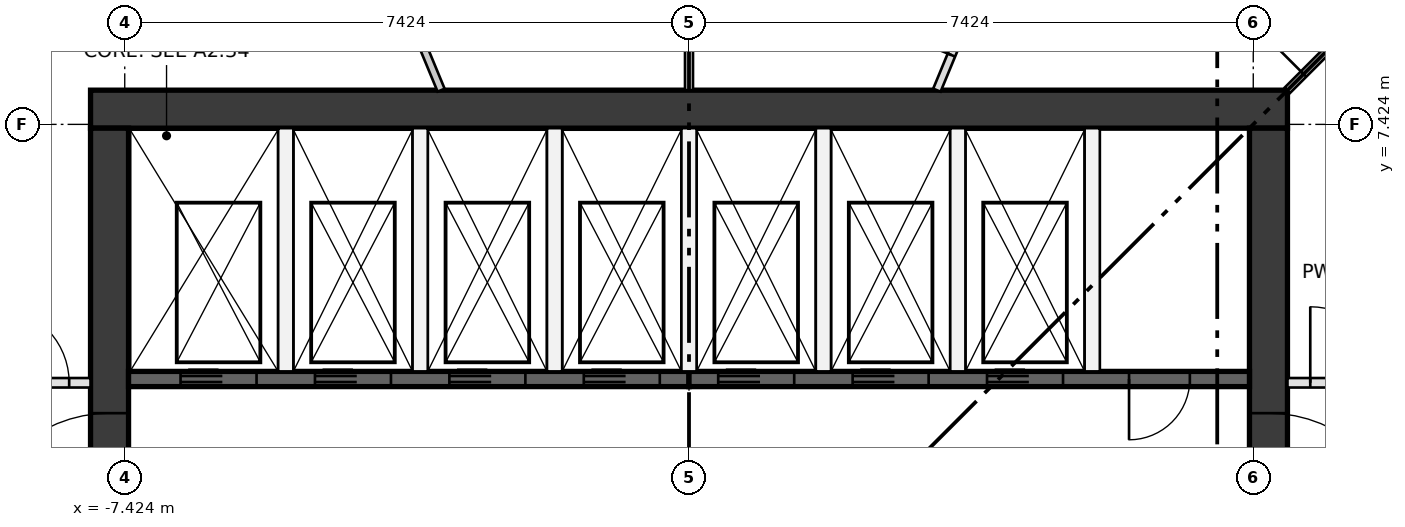
"""IFC4 building model, lengths in metres.
Left out: names, types, materials, properties, quantities, classifications, styles, units other than length and angle.
Written with IfcOpenShell. Run it as: python <this file> out.ifc"""

import sys

from ifc_helpers import new_model, si_unit, direction, frame, frame_2d, origin, place, context, subcontext, project, spatial, rectangle, extrude, element, fill, save


model = new_model("IFC4")
c1 = context("Model", 3, precision=1e-05, world=origin(), true_north=direction((0.0, 1.0)))
c2 = subcontext(c1, "Body", "Model", "MODEL_VIEW")
j1 = project(units=[si_unit("LENGTHUNIT", "METRE"), si_unit("PLANEANGLEUNIT", "RADIAN")], contexts=[c1])
p1 = place(None, origin())
s1 = spatial("IfcSite", under=j1, at=p1, CompositionType="ELEMENT")
p2 = place(p1, origin())
s2 = spatial("IfcBuilding", under=s1, at=p2, CompositionType="ELEMENT")
p3 = place(p2, frame((0.0, 0.0, 207.75)))
s3 = spatial("IfcBuildingStorey", under=s2, at=p3, CompositionType="ELEMENT", Elevation=207.75)
p4 = place(p3, frame((-7.874, 7.624, 0.0), z_axis=(0.0, 0.0, 1.0), x_axis=(1.0, 0.0, 0.0)))
e1 = element("IfcWall", 1, at=p4, inside=s3, PredefinedType="SHEAR", context=c2, shape_type="SweptSolid", body=[
    extrude(rectangle(XDim=15.748, YDim=0.5, at=frame_2d((7.874, 0.0))), origin(), (0.0, 0.0, 1.0), 3.35),
])
p5 = place(p3, frame((-7.624, -7.374, 0.0), z_axis=(0.0, 0.0, 1.0), x_axis=(0.0, 1.0, 0.0)))
e2 = element("IfcWall", 2, at=p5, inside=s3, PredefinedType="SHEAR", context=c2, shape_type="SweptSolid", body=[
    extrude(rectangle(XDim=14.748, YDim=0.5, at=frame_2d((7.374, 0.0))), origin(), (0.0, 0.0, 1.0), 3.35),
])
p6 = place(p5, frame((6.874, 0.0, 0.0)))
e3 = element("IfcOpeningElement", 3, at=p6, cuts=e2, PredefinedType="OPENING", context=c2, shape_type="SweptSolid", body=[
    extrude(rectangle(XDim=1.0, YDim=2.1, at=frame_2d((0.5, 1.05))), frame((0.0, 0.26, 0.0), z_axis=(0.0, -1.0, 0.0), x_axis=(1.0, 0.0, 0.0)), (0.0, 0.0, 1.0), 0.52),
])
p7 = place(p5, frame((3.75, 0.0, 0.0)))
e4 = element("IfcOpeningElement", 4, at=p7, cuts=e2, PredefinedType="OPENING", context=c2, shape_type="SweptSolid", body=[
    extrude(rectangle(XDim=1.8, YDim=2.1, at=frame_2d((0.9, 1.05))), frame((0.0, 0.26, 0.0), z_axis=(0.0, -1.0, 0.0), x_axis=(1.0, 0.0, 0.0)), (0.0, 0.0, 1.0), 0.52),
])
p8 = place(p5, frame((9.198, 0.0, 0.0)))
e5 = element("IfcOpeningElement", 5, at=p8, cuts=e2, PredefinedType="OPENING", context=c2, shape_type="SweptSolid", body=[
    extrude(rectangle(XDim=1.8, YDim=2.1, at=frame_2d((0.9, 1.05))), frame((0.0, 0.26, 0.0), z_axis=(0.0, -1.0, 0.0), x_axis=(1.0, 0.0, 0.0)), (0.0, 0.0, 1.0), 0.52),
])
p9 = place(p3, frame((7.624, -7.374, 0.0), z_axis=(0.0, 0.0, 1.0), x_axis=(0.0, 1.0, 0.0)))
e6 = element("IfcWall", 6, at=p9, inside=s3, PredefinedType="SHEAR", context=c2, shape_type="SweptSolid", body=[
    extrude(rectangle(XDim=14.748, YDim=0.5, at=frame_2d((7.374, 0.0))), origin(), (0.0, 0.0, 1.0), 3.35),
])
p10 = place(p9, frame((6.874, 0.0, 0.0)))
e7 = element("IfcOpeningElement", 7, at=p10, cuts=e6, PredefinedType="OPENING", context=c2, shape_type="SweptSolid", body=[
    extrude(rectangle(XDim=1.0, YDim=2.1, at=frame_2d((0.5, 1.05))), frame((0.0, 0.26, 0.0), z_axis=(0.0, -1.0, 0.0), x_axis=(1.0, 0.0, 0.0)), (0.0, 0.0, 1.0), 0.52),
])
p11 = place(p9, frame((3.75, 0.0, 0.0)))
e8 = element("IfcOpeningElement", 8, at=p11, cuts=e6, PredefinedType="OPENING", context=c2, shape_type="SweptSolid", body=[
    extrude(rectangle(XDim=1.8, YDim=2.1, at=frame_2d((0.9, 1.05))), frame((0.0, 0.26, 0.0), z_axis=(0.0, -1.0, 0.0), x_axis=(1.0, 0.0, 0.0)), (0.0, 0.0, 1.0), 0.52),
])
p12 = place(p9, frame((9.198, 0.0, 0.0)))
e9 = element("IfcOpeningElement", 9, at=p12, cuts=e6, PredefinedType="OPENING", context=c2, shape_type="SweptSolid", body=[
    extrude(rectangle(XDim=1.8, YDim=2.1, at=frame_2d((0.9, 1.05))), frame((0.0, 0.26, 0.0), z_axis=(0.0, -1.0, 0.0), x_axis=(1.0, 0.0, 0.0)), (0.0, 0.0, 1.0), 0.52),
])
p13 = place(p3, frame((-7.374, 4.074, 0.0), z_axis=(0.0, 0.0, 1.0), x_axis=(1.0, 0.0, 0.0)))
e10 = element("IfcWall", 10, at=p13, inside=s3, PredefinedType="SHEAR", context=c2, shape_type="SweptSolid", body=[
    extrude(rectangle(XDim=7.374, YDim=0.2, at=frame_2d((3.687, 0.0))), origin(), (0.0, 0.0, 1.0), 3.0),
])
p14 = place(p13, frame((0.684, 0.0, 0.0)))
e11 = element("IfcOpeningElement", 11, at=p14, cuts=e10, PredefinedType="OPENING", context=c2, shape_type="SweptSolid", body=[
    extrude(rectangle(XDim=1.0, YDim=2.1, at=frame_2d((0.5, 1.05))), frame((0.0, 0.11, 0.0), z_axis=(0.0, -1.0, 0.0), x_axis=(1.0, 0.0, 0.0)), (0.0, 0.0, 1.0), 0.22),
])
p15 = place(p13, frame((2.453, 0.0, 0.0)))
e12 = element("IfcOpeningElement", 12, at=p15, cuts=e10, PredefinedType="OPENING", context=c2, shape_type="SweptSolid", body=[
    extrude(rectangle(XDim=1.0, YDim=2.1, at=frame_2d((0.5, 1.05))), frame((0.0, 0.11, 0.0), z_axis=(0.0, -1.0, 0.0), x_axis=(1.0, 0.0, 0.0)), (0.0, 0.0, 1.0), 0.22),
])
p16 = place(p13, frame((4.221, 0.0, 0.0)))
e13 = element("IfcOpeningElement", 13, at=p16, cuts=e10, PredefinedType="OPENING", context=c2, shape_type="SweptSolid", body=[
    extrude(rectangle(XDim=1.0, YDim=2.1, at=frame_2d((0.5, 1.05))), frame((0.0, 0.11, 0.0), z_axis=(0.0, -1.0, 0.0), x_axis=(1.0, 0.0, 0.0)), (0.0, 0.0, 1.0), 0.22),
])
p17 = place(p13, frame((5.99, 0.0, 0.0)))
e14 = element("IfcOpeningElement", 14, at=p17, cuts=e10, PredefinedType="OPENING", context=c2, shape_type="SweptSolid", body=[
    extrude(rectangle(XDim=1.0, YDim=2.1, at=frame_2d((0.5, 1.05))), frame((0.0, 0.11, 0.0), z_axis=(0.0, -1.0, 0.0), x_axis=(1.0, 0.0, 0.0)), (0.0, 0.0, 1.0), 0.22),
])
p18 = place(p3, frame((0.0, 4.074, 0.0), z_axis=(0.0, 0.0, 1.0), x_axis=(1.0, 0.0, 0.0)))
e15 = element("IfcWall", 15, at=p18, inside=s3, PredefinedType="SHEAR", context=c2, shape_type="SweptSolid", body=[
    extrude(rectangle(XDim=7.374, YDim=0.2, at=frame_2d((3.687, 0.0))), origin(), (0.0, 0.0, 1.0), 3.0),
])
p19 = place(p18, frame((0.384, 0.0, 0.0)))
e16 = element("IfcOpeningElement", 16, at=p19, cuts=e15, PredefinedType="OPENING", context=c2, shape_type="SweptSolid", body=[
    extrude(rectangle(XDim=1.0, YDim=2.1, at=frame_2d((0.5, 1.05))), frame((0.0, 0.11, 0.0), z_axis=(0.0, -1.0, 0.0), x_axis=(1.0, 0.0, 0.0)), (0.0, 0.0, 1.0), 0.22),
])
p20 = place(p18, frame((2.153, 0.0, 0.0)))
e17 = element("IfcOpeningElement", 17, at=p20, cuts=e15, PredefinedType="OPENING", context=c2, shape_type="SweptSolid", body=[
    extrude(rectangle(XDim=1.0, YDim=2.1, at=frame_2d((0.5, 1.05))), frame((0.0, 0.11, 0.0), z_axis=(0.0, -1.0, 0.0), x_axis=(1.0, 0.0, 0.0)), (0.0, 0.0, 1.0), 0.22),
])
p21 = place(p18, frame((3.921, 0.0, 0.0)))
e18 = element("IfcOpeningElement", 18, at=p21, cuts=e15, PredefinedType="OPENING", context=c2, shape_type="SweptSolid", body=[
    extrude(rectangle(XDim=1.0, YDim=2.1, at=frame_2d((0.5, 1.05))), frame((0.0, 0.11, 0.0), z_axis=(0.0, -1.0, 0.0), x_axis=(1.0, 0.0, 0.0)), (0.0, 0.0, 1.0), 0.22),
])
p22 = place(p18, frame((5.79, 0.0, 0.0)))
e19 = element("IfcOpeningElement", 19, at=p22, cuts=e15, PredefinedType="OPENING", context=c2, shape_type="SweptSolid", body=[
    extrude(rectangle(XDim=0.8, YDim=2.1, at=frame_2d((0.4, 1.05))), frame((0.0, 0.11, 0.0), z_axis=(0.0, -1.0, 0.0), x_axis=(1.0, 0.0, 0.0)), (0.0, 0.0, 1.0), 0.22),
])
for number, where, z_axis, x_axis in (
    (20, (-5.305, 4.174, 0.0), (0.0, 0.0, 1.0), (0.0, 1.0, 0.0)),
    (21, (-3.537, 4.174, 0.0), (0.0, 0.0, 1.0), (0.0, 1.0, 0.0)),
    (22, (-1.769, 4.174, 0.0), (0.0, 0.0, 1.0), (0.0, 1.0, 0.0)),
    (23, (0.0, 4.174, 0.0), (0.0, 0.0, 1.0), (0.0, 1.0, 0.0)),
    (24, (1.769, 4.174, 0.0), (0.0, 0.0, 1.0), (0.0, 1.0, 0.0)),
    (25, (3.537, 4.174, 0.0), (0.0, 0.0, 1.0), (0.0, 1.0, 0.0)),
    (26, (5.305, 4.174, 0.0), (0.0, 0.0, 1.0), (0.0, 1.0, 0.0)),
):
    element("IfcWall", number, at=place(p3, frame(where, z_axis=z_axis, x_axis=x_axis)), inside=s3, PredefinedType="PARTITIONING", context=c2, shape_type="SweptSolid", body=[
        extrude(rectangle(XDim=3.2, YDim=0.2, at=frame_2d((1.6, 0.0))), origin(), (0.0, 0.0, 1.0), 3.0),
    ])
p23 = place(p3, frame((7.874, 4.024, 0.0), z_axis=(0.0, 0.0, 1.0), x_axis=(1.0, 0.0, 0.0)))
e27 = element("IfcWall", 27, at=p23, inside=s3, PredefinedType="PARTITIONING", context=c2, shape_type="SweptSolid", body=[
    extrude(rectangle(XDim=2.475, YDim=0.125, at=frame_2d((1.238, 0.0))), origin(), (0.0, 0.0, 1.0), 3.0),
])
p24 = place(p23, frame((0.3, 0.0, 0.0)))
e28 = element("IfcOpeningElement", 28, at=p24, cuts=e27, PredefinedType="OPENING", context=c2, shape_type="SweptSolid", body=[
    extrude(rectangle(XDim=1.0, YDim=2.1, at=frame_2d((0.5, 1.05))), frame((0.0, 0.073, 0.0), z_axis=(0.0, -1.0, 0.0), x_axis=(1.0, 0.0, 0.0)), (0.0, 0.0, 1.0), 0.145),
])
p25 = place(p3, frame((-9.436, 4.024, 0.0), z_axis=(0.0, 0.0, 1.0), x_axis=(1.0, 0.0, 0.0)))
e29 = element("IfcWall", 29, at=p25, inside=s3, PredefinedType="PARTITIONING", context=c2, shape_type="SweptSolid", body=[
    extrude(rectangle(XDim=1.562, YDim=0.125, at=frame_2d((0.781, 0.0))), origin(), (0.0, 0.0, 1.0), 3.0),
])
p26 = place(p25, frame((0.281, 0.0, 0.0)))
e30 = element("IfcOpeningElement", 30, at=p26, cuts=e29, PredefinedType="OPENING", context=c2, shape_type="SweptSolid", body=[
    extrude(rectangle(XDim=1.0, YDim=2.1, at=frame_2d((0.5, 1.05))), frame((0.0, 0.073, 0.0), z_axis=(0.0, -1.0, 0.0), x_axis=(1.0, 0.0, 0.0)), (0.0, 0.0, 1.0), 0.145),
])
p27 = place(p3, frame((7.874, 7.874, 0.0), z_axis=(0.0, 0.0, 1.0), x_axis=(0.707106781187, 0.707106781187, 0.0)))
e31 = element("IfcWall", 31, at=p27, inside=s3, PredefinedType="PARTITIONING", context=c2, shape_type="SweptSolid", body=[
    extrude(rectangle(XDim=4.334, YDim=0.1, at=frame_2d((2.167, 0.0))), origin(), (0.0, 0.0, 1.0), 3.0),
])
p28 = place(p27, frame((0.3, 0.0, 0.0)))
e32 = element("IfcOpeningElement", 32, at=p28, cuts=e31, PredefinedType="OPENING", context=c2, shape_type="SweptSolid", body=[
    extrude(rectangle(XDim=1.0, YDim=2.1, at=frame_2d((0.5, 1.05))), frame((0.0, 0.06, 0.0), z_axis=(0.0, -1.0, 0.0), x_axis=(1.0, 0.0, 0.0)), (0.0, 0.0, 1.0), 0.12),
])
p29 = place(p3, frame((3.261, 7.874, 0.0), z_axis=(0.0, 0.0, 1.0), x_axis=(0.382670108955, 0.923885051136, 0.0)))
e33 = element("IfcWall", 33, at=p29, inside=s3, PredefinedType="PARTITIONING", context=c2, shape_type="SweptSolid", body=[
    extrude(rectangle(XDim=2.077, YDim=0.105, at=frame_2d((1.039, 0.0))), origin(), (0.0, 0.0, 1.0), 3.0),
])
p30 = place(p29, frame((0.5, 0.0, 0.0)))
e34 = element("IfcOpeningElement", 34, at=p30, cuts=e33, PredefinedType="OPENING", context=c2, shape_type="SweptSolid", body=[
    extrude(rectangle(XDim=1.0, YDim=2.1, at=frame_2d((0.5, 1.05))), frame((0.0, 0.062, 0.0), z_axis=(0.0, -1.0, 0.0), x_axis=(1.0, 0.0, 0.0)), (0.0, 0.0, 1.0), 0.125),
])
p31 = place(p3, frame((0.0, 7.874, 0.0), z_axis=(0.0, 0.0, 1.0), x_axis=(0.0, 1.0, 0.0)))
e35 = element("IfcWall", 35, at=p31, inside=s3, PredefinedType="PARTITIONING", context=c2, shape_type="SweptSolid", body=[
    extrude(rectangle(XDim=2.726, YDim=0.105, at=frame_2d((1.363, 0.0))), origin(), (0.0, 0.0, 1.0), 3.0),
])
p32 = place(p3, frame((-4.056, 9.793, 0.0), z_axis=(0.0, 0.0, 1.0), x_axis=(0.382670108955, -0.923885051136, 0.0)))
e36 = element("IfcWall", 36, at=p32, inside=s3, PredefinedType="PARTITIONING", context=c2, shape_type="SweptSolid", body=[
    extrude(rectangle(XDim=2.077, YDim=0.1, at=frame_2d((1.039, 0.0))), origin(), (0.0, 0.0, 1.0), 3.0),
])
p33 = place(p32, frame((0.5, 0.0, 0.0)))
e37 = element("IfcOpeningElement", 37, at=p33, cuts=e36, PredefinedType="OPENING", context=c2, shape_type="SweptSolid", body=[
    extrude(rectangle(XDim=1.0, YDim=2.1, at=frame_2d((0.5, 1.05))), frame((0.0, 0.06, 0.0), z_axis=(0.0, -1.0, 0.0), x_axis=(1.0, 0.0, 0.0)), (0.0, 0.0, 1.0), 0.12),
])
p34 = place(p14, frame((1.0, 0.0, 0.0), z_axis=(0.0, 0.0, 1.0), x_axis=(-1.0, 0.0, 0.0)))
e38 = element("IfcDoor", 38, at=p34, inside=s3, OperationType="DOUBLE_DOOR_SLIDING", PredefinedType="DOOR", context=c2, shape_type="SweptSolid", body=[
    extrude(rectangle(XDim=1.0, YDim=2.1, at=frame_2d((0.5, 1.05))), frame((0.0, 0.025, 0.0), z_axis=(0.0, -1.0, 0.0), x_axis=(1.0, 0.0, 0.0)), (0.0, 0.0, 1.0), 0.05),
])
fill(e11, e38)
p35 = place(p15, frame((1.0, 0.0, 0.0), z_axis=(0.0, 0.0, 1.0), x_axis=(-1.0, 0.0, 0.0)))
e39 = element("IfcDoor", 39, at=p35, inside=s3, OperationType="DOUBLE_DOOR_SLIDING", PredefinedType="DOOR", context=c2, shape_type="SweptSolid", body=[
    extrude(rectangle(XDim=1.0, YDim=2.1, at=frame_2d((0.5, 1.05))), frame((0.0, 0.025, 0.0), z_axis=(0.0, -1.0, 0.0), x_axis=(1.0, 0.0, 0.0)), (0.0, 0.0, 1.0), 0.05),
])
fill(e12, e39)
p36 = place(p16, frame((1.0, 0.0, 0.0), z_axis=(0.0, 0.0, 1.0), x_axis=(-1.0, 0.0, 0.0)))
e40 = element("IfcDoor", 40, at=p36, inside=s3, OperationType="DOUBLE_DOOR_SLIDING", PredefinedType="DOOR", context=c2, shape_type="SweptSolid", body=[
    extrude(rectangle(XDim=1.0, YDim=2.1, at=frame_2d((0.5, 1.05))), frame((0.0, 0.025, 0.0), z_axis=(0.0, -1.0, 0.0), x_axis=(1.0, 0.0, 0.0)), (0.0, 0.0, 1.0), 0.05),
])
fill(e13, e40)
p37 = place(p17, frame((1.0, 0.0, 0.0), z_axis=(0.0, 0.0, 1.0), x_axis=(-1.0, 0.0, 0.0)))
e41 = element("IfcDoor", 41, at=p37, inside=s3, OperationType="DOUBLE_DOOR_SLIDING", PredefinedType="DOOR", context=c2, shape_type="SweptSolid", body=[
    extrude(rectangle(XDim=1.0, YDim=2.1, at=frame_2d((0.5, 1.05))), frame((0.0, 0.025, 0.0), z_axis=(0.0, -1.0, 0.0), x_axis=(1.0, 0.0, 0.0)), (0.0, 0.0, 1.0), 0.05),
])
fill(e14, e41)
p38 = place(p19, frame((1.0, 0.0, 0.0), z_axis=(0.0, 0.0, 1.0), x_axis=(-1.0, 0.0, 0.0)))
e42 = element("IfcDoor", 42, at=p38, inside=s3, OperationType="DOUBLE_DOOR_SLIDING", PredefinedType="DOOR", context=c2, shape_type="SweptSolid", body=[
    extrude(rectangle(XDim=1.0, YDim=2.1, at=frame_2d((0.5, 1.05))), frame((0.0, 0.025, 0.0), z_axis=(0.0, -1.0, 0.0), x_axis=(1.0, 0.0, 0.0)), (0.0, 0.0, 1.0), 0.05),
])
fill(e16, e42)
p39 = place(p20, frame((1.0, 0.0, 0.0), z_axis=(0.0, 0.0, 1.0), x_axis=(-1.0, 0.0, 0.0)))
e43 = element("IfcDoor", 43, at=p39, inside=s3, OperationType="DOUBLE_DOOR_SLIDING", PredefinedType="DOOR", context=c2, shape_type="SweptSolid", body=[
    extrude(rectangle(XDim=1.0, YDim=2.1, at=frame_2d((0.5, 1.05))), frame((0.0, 0.025, 0.0), z_axis=(0.0, -1.0, 0.0), x_axis=(1.0, 0.0, 0.0)), (0.0, 0.0, 1.0), 0.05),
])
fill(e17, e43)
p40 = place(p21, frame((1.0, 0.0, 0.0), z_axis=(0.0, 0.0, 1.0), x_axis=(-1.0, 0.0, 0.0)))
e44 = element("IfcDoor", 44, at=p40, inside=s3, OperationType="DOUBLE_DOOR_SLIDING", PredefinedType="DOOR", context=c2, shape_type="SweptSolid", body=[
    extrude(rectangle(XDim=1.0, YDim=2.1, at=frame_2d((0.5, 1.05))), frame((0.0, 0.025, 0.0), z_axis=(0.0, -1.0, 0.0), x_axis=(1.0, 0.0, 0.0)), (0.0, 0.0, 1.0), 0.05),
])
fill(e18, e44)
p41 = place(p22, frame((0.8, 0.0, 0.0), z_axis=(0.0, 0.0, 1.0), x_axis=(-1.0, 0.0, 0.0)))
e45 = element("IfcDoor", 45, at=p41, inside=s3, OperationType="SINGLE_SWING_LEFT", PredefinedType="DOOR", context=c2, shape_type="SweptSolid", body=[
    extrude(rectangle(XDim=0.8, YDim=2.1, at=frame_2d((0.4, 1.05))), frame((0.0, 0.025, 0.0), z_axis=(0.0, -1.0, 0.0), x_axis=(1.0, 0.0, 0.0)), (0.0, 0.0, 1.0), 0.05),
])
fill(e19, e45)
p42 = place(p8, origin())
e46 = element("IfcDoor", 46, at=p42, inside=s3, OperationType="DOUBLE_DOOR_SINGLE_SWING", PredefinedType="DOOR", context=c2, shape_type="SweptSolid", body=[
    extrude(rectangle(XDim=1.8, YDim=2.1, at=frame_2d((0.9, 1.05))), frame((0.0, 0.025, 0.0), z_axis=(0.0, -1.0, 0.0), x_axis=(1.0, 0.0, 0.0)), (0.0, 0.0, 1.0), 0.05),
])
fill(e5, e46)
p43 = place(p12, frame((1.8, 0.0, 0.0), z_axis=(0.0, 0.0, 1.0), x_axis=(-1.0, 0.0, 0.0)))
e47 = element("IfcDoor", 47, at=p43, inside=s3, OperationType="DOUBLE_DOOR_SINGLE_SWING", PredefinedType="DOOR", context=c2, shape_type="SweptSolid", body=[
    extrude(rectangle(XDim=1.8, YDim=2.1, at=frame_2d((0.9, 1.05))), frame((0.0, 0.025, 0.0), z_axis=(0.0, -1.0, 0.0), x_axis=(1.0, 0.0, 0.0)), (0.0, 0.0, 1.0), 0.05),
])
fill(e9, e47)
p44 = place(p24, origin())
e48 = element("IfcDoor", 48, at=p44, inside=s3, OperationType="SINGLE_SWING_LEFT", PredefinedType="DOOR", context=c2, shape_type="SweptSolid", body=[
    extrude(rectangle(XDim=1.0, YDim=2.1, at=frame_2d((0.5, 1.05))), frame((0.0, 0.025, 0.0), z_axis=(0.0, -1.0, 0.0), x_axis=(1.0, 0.0, 0.0)), (0.0, 0.0, 1.0), 0.05),
])
fill(e28, e48)
p45 = place(p26, origin())
e49 = element("IfcDoor", 49, at=p45, inside=s3, OperationType="SINGLE_SWING_LEFT", PredefinedType="DOOR", context=c2, shape_type="SweptSolid", body=[
    extrude(rectangle(XDim=1.0, YDim=2.1, at=frame_2d((0.5, 1.05))), frame((0.0, 0.025, 0.0), z_axis=(0.0, -1.0, 0.0), x_axis=(1.0, 0.0, 0.0)), (0.0, 0.0, 1.0), 0.05),
])
fill(e30, e49)
p46 = place(p28, origin())
e50 = element("IfcDoor", 50, at=p46, inside=s3, OperationType="SINGLE_SWING_LEFT", PredefinedType="DOOR", context=c2, shape_type="SweptSolid", body=[
    extrude(rectangle(XDim=1.0, YDim=2.1, at=frame_2d((0.5, 1.05))), frame((0.0, 0.025, 0.0), z_axis=(0.0, -1.0, 0.0), x_axis=(1.0, 0.0, 0.0)), (0.0, 0.0, 1.0), 0.05),
])
fill(e32, e50)
p47 = place(p30, origin())
e51 = element("IfcDoor", 51, at=p47, inside=s3, OperationType="SINGLE_SWING_LEFT", PredefinedType="DOOR", context=c2, shape_type="SweptSolid", body=[
    extrude(rectangle(XDim=1.0, YDim=2.1, at=frame_2d((0.5, 1.05))), frame((0.0, 0.025, 0.0), z_axis=(0.0, -1.0, 0.0), x_axis=(1.0, 0.0, 0.0)), (0.0, 0.0, 1.0), 0.05),
])
fill(e34, e51)
save(model, sys.argv[1])
